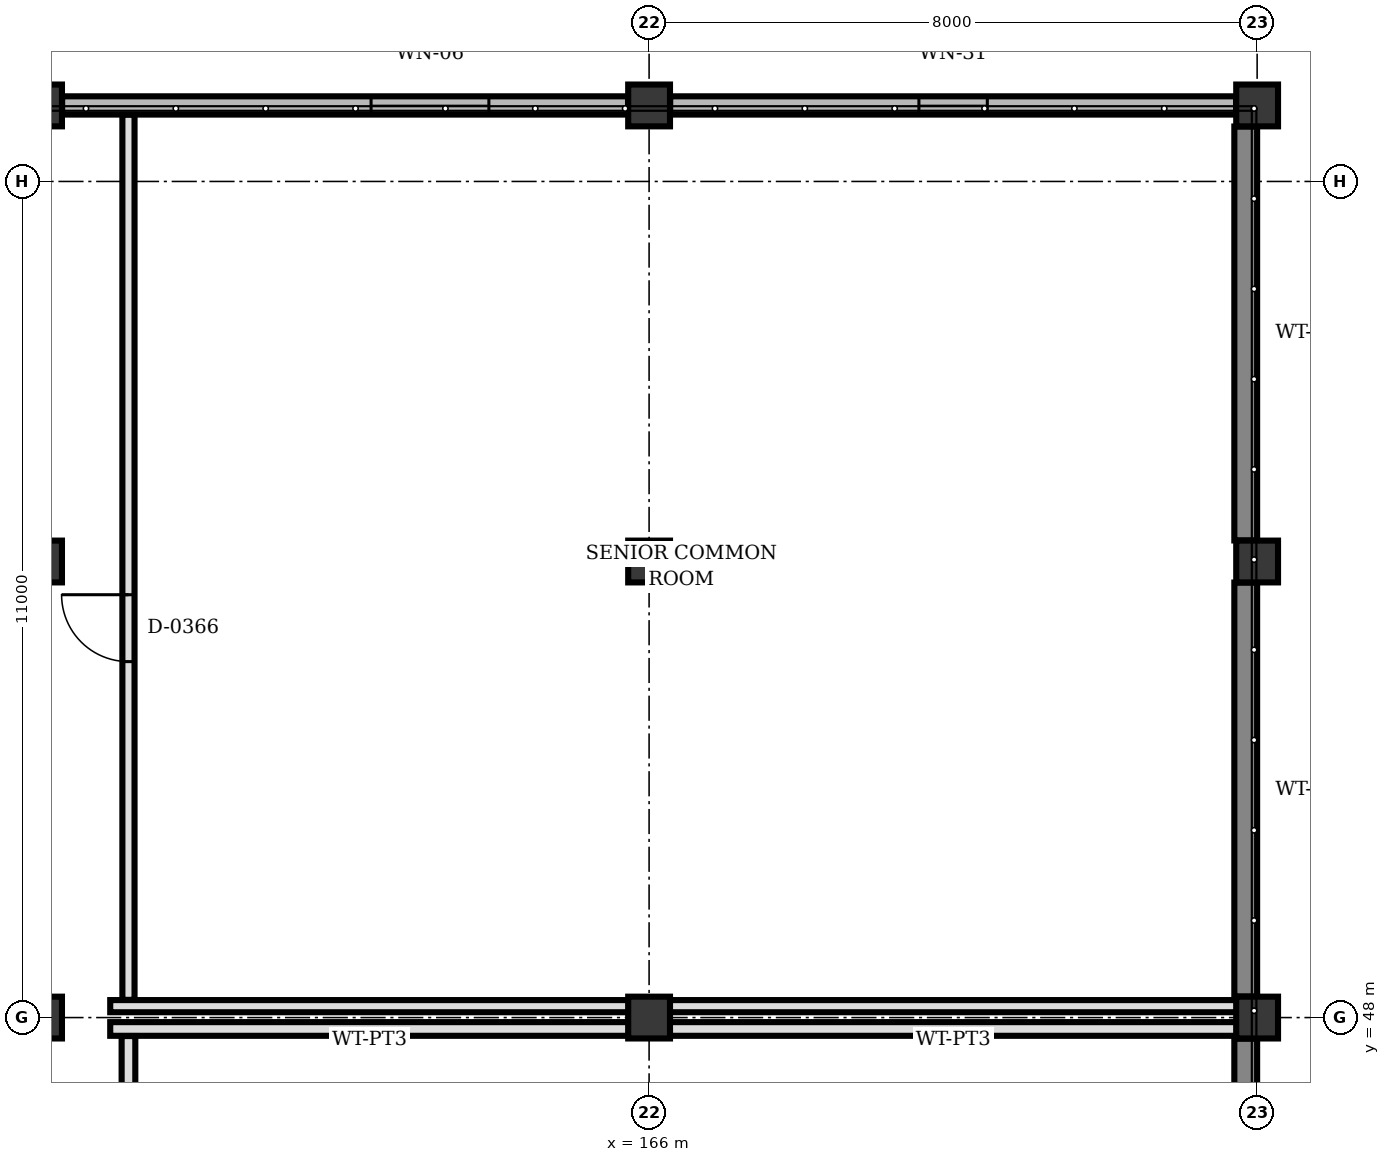
"""IFC4 building model, lengths in metres.
Left out: names, types, materials, properties, quantities, classifications, styles, units other than length and angle.
Written with IfcOpenShell. Run it as: python <this file> out.ifc"""

import sys

from ifc_helpers import new_model, si_unit, direction, frame, frame_2d, origin, origin_2d, place, context, subcontext, project, spatial, rectangle, extrude, element, fill, save


model = new_model("IFC4")
c1 = context("Model", 3, precision=1e-05, world=origin(), true_north=direction((0.0, 1.0)))
c2 = subcontext(c1, "Body", "Model", "MODEL_VIEW")
j1 = project(units=[si_unit("LENGTHUNIT", "METRE"), si_unit("PLANEANGLEUNIT", "RADIAN")], contexts=[c1])
p1 = place(None, origin())
s1 = spatial("IfcSite", under=j1, at=p1, CompositionType="ELEMENT")
p2 = place(p1, origin())
s2 = spatial("IfcBuilding", under=s1, at=p2, CompositionType="ELEMENT")
p3 = place(p2, frame((0.0, 0.0, 8.5)))
s3 = spatial("IfcBuildingStorey", under=s2, at=p3, CompositionType="ELEMENT", Elevation=8.5)
for number, where, z_axis, x_axis in (
    (1, (158.0, 48.0, 0.0), (0.0, 0.0, 1.0), (1.0, 0.0, 0.0)),
    (2, (158.0, 54.0, 0.0), (0.0, 0.0, 1.0), (1.0, 0.0, 0.0)),
    (3, (158.0, 60.0, 0.0), (0.0, 0.0, 1.0), (1.0, 0.0, 0.0)),
    (4, (166.0, 48.0, 0.0), (0.0, 0.0, 1.0), (1.0, 0.0, 0.0)),
    (5, (166.0, 54.0, 0.0), (0.0, 0.0, 1.0), (1.0, 0.0, 0.0)),
    (6, (166.0, 60.0, 0.0), (0.0, 0.0, 1.0), (1.0, 0.0, 0.0)),
    (7, (174.0, 48.0, 0.0), (0.0, 0.0, 1.0), (1.0, 0.0, 0.0)),
    (8, (174.0, 54.0, 0.0), (0.0, 0.0, 1.0), (1.0, 0.0, 0.0)),
    (9, (174.0, 60.0, 0.0), (0.0, 0.0, 1.0), (1.0, 0.0, 0.0)),
):
    element("IfcColumn", number, at=place(p3, frame(where, z_axis=z_axis, x_axis=x_axis)), inside=s3, PredefinedType="COLUMN", context=c2, shape_type="SweptSolid", body=[
        extrude(rectangle(XDim=0.55, YDim=0.55, at=origin_2d()), origin(), (0.0, 0.0, 1.0), 4.0),
    ])
p4 = place(p3, frame((158.277, 60.0, 0.0), z_axis=(0.0, 0.0, 1.0), x_axis=(1.0, 0.0, 0.0)))
e10 = element("IfcWall", 10, at=p4, inside=s3, PredefinedType="SOLIDWALL", context=c2, shape_type="SweptSolid", body=[
    extrude(rectangle(XDim=7.446, YDim=0.24, at=frame_2d((3.723, 0.0))), origin(), (0.0, 0.0, 1.0), 3.002),
])
p5 = place(p4, frame((4.065, 0.0, 0.9)))
e11 = element("IfcOpeningElement", 11, at=p5, cuts=e10, PredefinedType="OPENING", context=c2, shape_type="SweptSolid", body=[
    extrude(rectangle(XDim=1.55, YDim=1.1, at=frame_2d((0.775, 0.55))), frame((0.0, 0.13, 0.0), z_axis=(0.0, -1.0, 0.0), x_axis=(1.0, 0.0, 0.0)), (0.0, 0.0, 1.0), 0.26),
])
p6 = place(p3, frame((166.277, 60.0, 0.0), z_axis=(0.0, 0.0, 1.0), x_axis=(1.0, 0.0, 0.0)))
e12 = element("IfcWall", 12, at=p6, inside=s3, PredefinedType="SOLIDWALL", context=c2, shape_type="SweptSolid", body=[
    extrude(rectangle(XDim=7.446, YDim=0.24, at=frame_2d((3.723, 0.0))), origin(), (0.0, 0.0, 1.0), 3.002),
])
p7 = place(p6, frame((3.273, 0.0, 0.9)))
e13 = element("IfcOpeningElement", 13, at=p7, cuts=e12, PredefinedType="OPENING", context=c2, shape_type="SweptSolid", body=[
    extrude(rectangle(XDim=0.9, YDim=1.55, at=frame_2d((0.45, 0.775))), frame((0.0, 0.13, 0.0), z_axis=(0.0, -1.0, 0.0), x_axis=(1.0, 0.0, 0.0)), (0.0, 0.0, 1.0), 0.26),
])
for number, where, z_axis, x_axis in (
    (14, (173.85, 59.723, 0.0), (0.0, 0.0, 1.0), (0.0, -1.0, 0.0)),
    (15, (173.85, 53.723, 0.0), (0.0, 0.0, 1.0), (0.0, -1.0, 0.0)),
):
    element("IfcWall", number, at=place(p3, frame(where, z_axis=z_axis, x_axis=x_axis)), inside=s3, PredefinedType="SHEAR", context=c2, shape_type="SweptSolid", body=[
        extrude(rectangle(XDim=5.446, YDim=0.3, at=frame_2d((2.723, 0.0))), origin(), (0.0, 0.0, 1.0), 3.002),
    ])
p8 = place(p3, frame((173.85, 47.723, 0.0), z_axis=(0.0, 0.0, 1.0), x_axis=(0.0, -1.0, 0.0)))
e16 = element("IfcWall", 16, at=p8, inside=s3, PredefinedType="SHEAR", context=c2, shape_type="SweptSolid", body=[
    extrude(rectangle(XDim=7.446, YDim=0.3, at=frame_2d((3.723, 0.0))), origin(), (0.0, 0.0, 1.0), 3.002),
])
p9 = place(p3, frame((158.91, 47.85, 0.0), z_axis=(0.0, 0.0, 1.0), x_axis=(1.0, 0.0, 0.0)))
e17 = element("IfcWall", 17, at=p9, inside=s3, PredefinedType="PARTITIONING", context=c2, shape_type="SweptSolid", body=[
    extrude(rectangle(XDim=6.823, YDim=0.18, at=frame_2d((3.412, 0.0))), origin(), (0.0, 0.0, 1.0), 3.002),
])
p10 = place(p3, frame((166.267, 47.85, 0.0), z_axis=(0.0, 0.0, 1.0), x_axis=(1.0, 0.0, 0.0)))
e18 = element("IfcWall", 18, at=p10, inside=s3, PredefinedType="PARTITIONING", context=c2, shape_type="SweptSolid", body=[
    extrude(rectangle(XDim=7.466, YDim=0.18, at=frame_2d((3.733, 0.0))), origin(), (0.0, 0.0, 1.0), 3.002),
])
p11 = place(p3, frame((159.15, 16.123, 0.0), z_axis=(0.0, 0.0, 1.0), x_axis=(0.0, 1.0, 0.0)))
e19 = element("IfcWall", 19, at=p11, inside=s3, PredefinedType="PARTITIONING", context=c2, shape_type="SweptSolid", body=[
    extrude(rectangle(XDim=31.634, YDim=0.18, at=frame_2d((15.817, 0.0))), origin(), (0.0, 0.0, 1.0), 3.002),
])
p12 = place(p11, frame((12.846, 0.0, 0.0)))
e20 = element("IfcOpeningElement", 20, at=p12, cuts=e19, PredefinedType="OPENING", context=c2, shape_type="SweptSolid", body=[
    extrude(rectangle(XDim=0.88, YDim=2.1, at=frame_2d((0.44, 1.05))), frame((0.0, 0.1, 0.0), z_axis=(0.0, -1.0, 0.0), x_axis=(1.0, 0.0, 0.0)), (0.0, 0.0, 1.0), 0.2),
])
p13 = place(p3, frame((173.733, 48.15, 0.0), z_axis=(0.0, 0.0, 1.0), x_axis=(-1.0, 0.0, 0.0)))
e21 = element("IfcWall", 21, at=p13, inside=s3, PredefinedType="PARTITIONING", context=c2, shape_type="SweptSolid", body=[
    extrude(rectangle(XDim=7.466, YDim=0.16, at=frame_2d((3.733, 0.0))), origin(), (0.0, 0.0, 1.0), 3.002),
])
p14 = place(p3, frame((165.733, 48.15, 0.0), z_axis=(0.0, 0.0, 1.0), x_axis=(-1.0, 0.0, 0.0)))
e22 = element("IfcWall", 22, at=p14, inside=s3, PredefinedType="PARTITIONING", context=c2, shape_type="SweptSolid", body=[
    extrude(rectangle(XDim=6.823, YDim=0.16, at=frame_2d((3.412, 0.0))), origin(), (0.0, 0.0, 1.0), 3.002),
])
p15 = place(p3, frame((159.15, 48.233, 0.0), z_axis=(0.0, 0.0, 1.0), x_axis=(0.0, 1.0, 0.0)))
e23 = element("IfcWall", 23, at=p15, inside=s3, PredefinedType="PARTITIONING", context=c2, shape_type="SweptSolid", body=[
    extrude(rectangle(XDim=11.644, YDim=0.16, at=frame_2d((5.822, 0.0))), origin(), (0.0, 0.0, 1.0), 3.002),
])
p16 = place(p15, frame((4.45, 0.0, 0.0)))
e24 = element("IfcOpeningElement", 24, at=p16, cuts=e23, PredefinedType="OPENING", context=c2, shape_type="SweptSolid", body=[
    extrude(rectangle(XDim=0.88, YDim=2.1, at=frame_2d((0.44, 1.05))), frame((0.0, 0.09, 0.0), z_axis=(0.0, -1.0, 0.0), x_axis=(1.0, 0.0, 0.0)), (0.0, 0.0, 1.0), 0.18),
])
p17 = place(p5, origin())
e25 = element("IfcWindow", 25, at=p17, inside=s3, PartitioningType="SINGLE_PANEL", PredefinedType="WINDOW", context=c2, shape_type="SweptSolid", body=[
    extrude(rectangle(XDim=1.55, YDim=1.1, at=frame_2d((0.775, 0.55))), frame((0.0, 0.03, 0.0), z_axis=(0.0, -1.0, 0.0), x_axis=(1.0, 0.0, 0.0)), (0.0, 0.0, 1.0), 0.06),
])
fill(e11, e25)
p18 = place(p7, origin())
e26 = element("IfcWindow", 26, at=p18, inside=s3, PartitioningType="SINGLE_PANEL", PredefinedType="WINDOW", context=c2, shape_type="SweptSolid", body=[
    extrude(rectangle(XDim=0.9, YDim=1.55, at=frame_2d((0.45, 0.775))), frame((0.0, 0.03, 0.0), z_axis=(0.0, -1.0, 0.0), x_axis=(1.0, 0.0, 0.0)), (0.0, 0.0, 1.0), 0.06),
])
fill(e13, e26)
p19 = place(p16, origin())
e27 = element("IfcDoor", 27, at=p19, inside=s3, OperationType="SINGLE_SWING_RIGHT", PredefinedType="DOOR", context=c2, shape_type="SweptSolid", body=[
    extrude(rectangle(XDim=0.88, YDim=2.1, at=frame_2d((0.44, 1.05))), frame((0.0, 0.025, 0.0), z_axis=(0.0, -1.0, 0.0), x_axis=(1.0, 0.0, 0.0)), (0.0, 0.0, 1.0), 0.05),
])
fill(e24, e27)
save(model, sys.argv[1])
